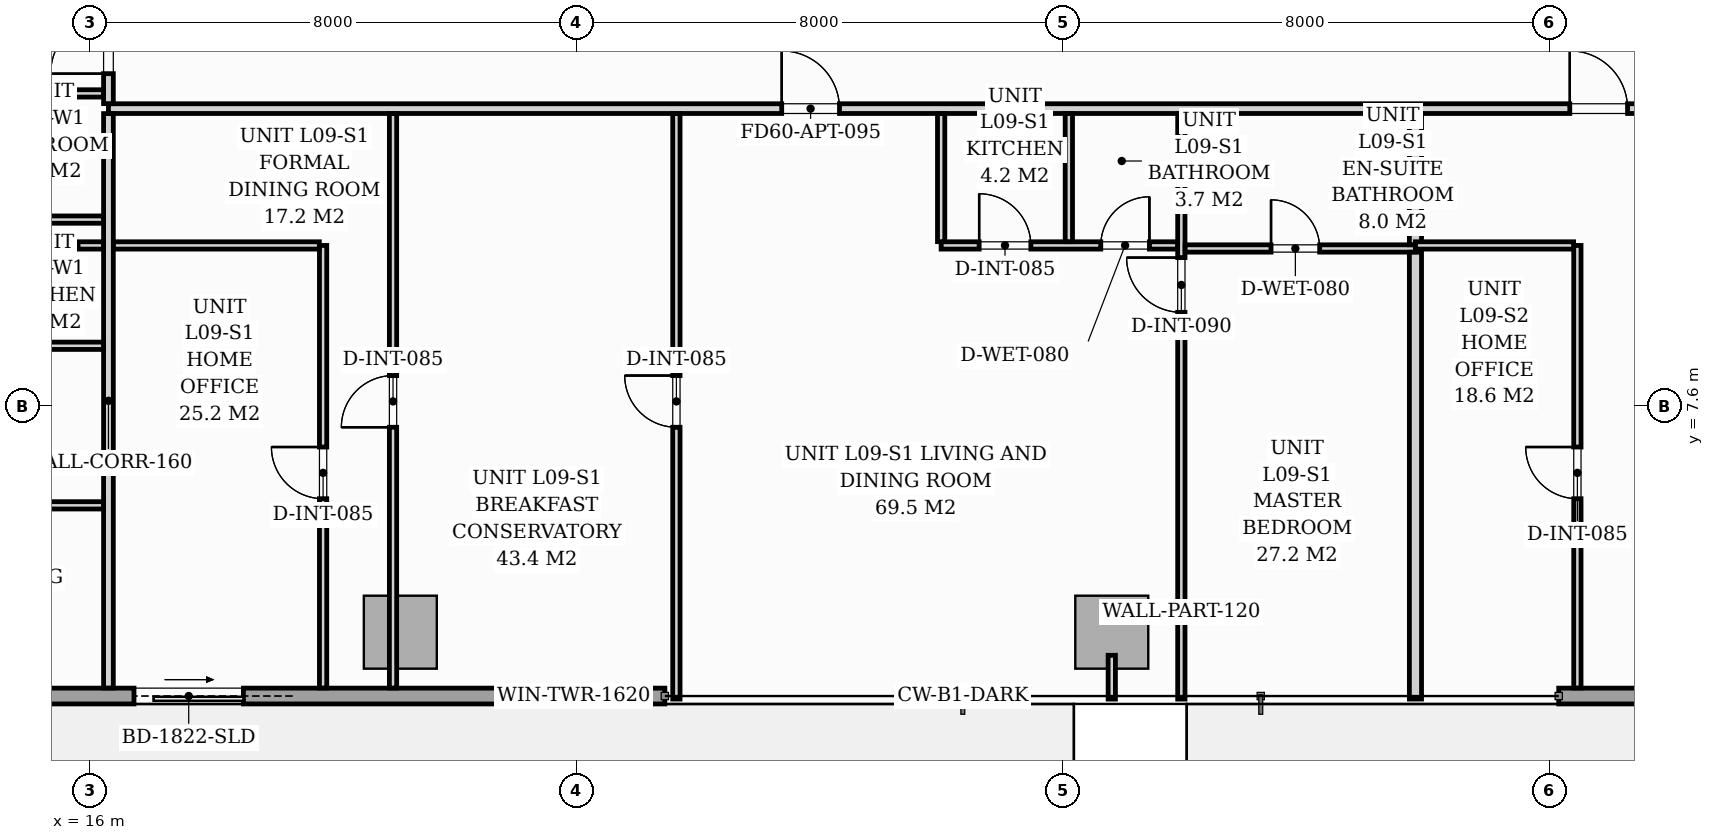
"""IFC4 building model, lengths in metres.
Left out: names, types, materials, properties, quantities, classifications, styles, units other than length and angle.
Written with IfcOpenShell. Run it as: python <this file> out.ifc"""

import sys

from ifc_helpers import new_model, si_unit, direction, frame, frame_2d, origin, origin_2d, place, context, subcontext, project, spatial, rectangle, extrude, source, transform, mapped, element, fill, save


model = new_model("IFC4")
c1 = context("Model", 3, precision=1e-05, world=origin(), true_north=direction((0.0, 1.0)))
c2 = subcontext(c1, "Body", "Model", "MODEL_VIEW")
j1 = project(units=[si_unit("LENGTHUNIT", "METRE"), si_unit("PLANEANGLEUNIT", "RADIAN")], contexts=[c1])
p1 = place(None, origin())
s1 = spatial("IfcSite", under=j1, at=p1, CompositionType="ELEMENT")
p2 = place(p1, origin())
s2 = spatial("IfcBuilding", under=s1, at=p2, CompositionType="ELEMENT")
p3 = place(p2, frame((0.0, 0.0, 35.8)))
s3 = spatial("IfcBuildingStorey", under=s2, at=p3, CompositionType="ELEMENT", Elevation=35.8)
m1 = source(origin(), c2, "Body", "SweptSolid", [
    extrude(rectangle(XDim=1.2, YDim=1.2, at=origin_2d()), origin(), (0.0, 0.0, 1.0), 3.196),
])
for number, where, z_axis, x_axis in (
    (1, (21.1, 3.88, 0.002), (0.0, 0.0, 1.0), (1.0, 0.0, 0.0)),
    (2, (32.8, 3.88, 0.002), (0.0, 0.0, 1.0), (1.0, 0.0, 0.0)),
):
    element("IfcColumn", number, at=place(p3, frame(where, z_axis=z_axis, x_axis=x_axis)), inside=s3, PredefinedType="COLUMN", context=c2, shape_type="MappedRepresentation", body=[
        mapped(m1, transform((0.0, 0.0, 0.0), scale=1.0)),
    ])
p4 = place(p3, frame((57.3, 2.83, 0.0), z_axis=(0.0, 0.0, 1.0), x_axis=(-1.0, 0.0, 0.0)))
e3 = element("IfcWall", 3, at=p4, inside=s3, PredefinedType="STANDARD", context=c2, shape_type="SweptSolid", body=[
    extrude(rectangle(XDim=17.15, YDim=0.26, at=frame_2d((8.575, 0.0))), origin(), (0.0, 0.0, 1.0), 2.94),
])
p5 = place(p4, frame((9.924, 0.0, 0.0)))
e4 = element("IfcOpeningElement", 4, at=p5, cuts=e3, PredefinedType="OPENING", context=c2, shape_type="SweptSolid", body=[
    extrude(rectangle(XDim=1.8, YDim=2.06, at=frame_2d((0.9, 1.03))), frame((0.0, 0.14, 0.0), z_axis=(0.0, -1.0, 0.0), x_axis=(1.0, 0.0, 0.0)), (0.0, 0.0, 1.0), 0.28),
])
p6 = place(p4, frame((2.05, 0.0, 0.65)))
e5 = element("IfcOpeningElement", 5, at=p6, cuts=e3, PredefinedType="OPENING", context=c2, shape_type="SweptSolid", body=[
    extrude(rectangle(XDim=1.6, YDim=1.5, at=frame_2d((0.8, 0.75))), frame((0.0, 0.14, 0.0), z_axis=(0.0, -1.0, 0.0), x_axis=(1.0, 0.0, 0.0)), (0.0, 0.0, 1.0), 0.28),
])
p7 = place(p4, frame((6.925, 0.0, 0.75)))
e6 = element("IfcOpeningElement", 6, at=p7, cuts=e3, PredefinedType="OPENING", context=c2, shape_type="SweptSolid", body=[
    extrude(rectangle(XDim=1.6, YDim=1.5, at=frame_2d((0.8, 0.75))), frame((0.0, 0.14, 0.0), z_axis=(0.0, -1.0, 0.0), x_axis=(1.0, 0.0, 0.0)), (0.0, 0.0, 1.0), 0.28),
])
p8 = place(p3, frame((25.45, 2.83, 0.0), z_axis=(0.0, 0.0, 1.0), x_axis=(-1.0, 0.0, 0.0)))
e7 = element("IfcWall", 7, at=p8, inside=s3, PredefinedType="STANDARD", context=c2, shape_type="SweptSolid", body=[
    extrude(rectangle(XDim=17.15, YDim=0.26, at=frame_2d((8.575, 0.0))), origin(), (0.0, 0.0, 1.0), 2.94),
])
p9 = place(p8, frame((6.93, 0.0, 0.0)))
e8 = element("IfcOpeningElement", 8, at=p9, cuts=e7, PredefinedType="OPENING", context=c2, shape_type="SweptSolid", body=[
    extrude(rectangle(XDim=1.8, YDim=2.06, at=frame_2d((0.9, 1.03))), frame((0.0, 0.14, 0.0), z_axis=(0.0, -1.0, 0.0), x_axis=(1.0, 0.0, 0.0)), (0.0, 0.0, 1.0), 0.28),
])
p10 = place(p8, frame((0.7, 0.0, 0.65)))
e9 = element("IfcOpeningElement", 9, at=p10, cuts=e7, PredefinedType="OPENING", context=c2, shape_type="SweptSolid", body=[
    extrude(rectangle(XDim=1.6, YDim=1.5, at=frame_2d((0.8, 0.75))), frame((0.0, 0.14, 0.0), z_axis=(0.0, -1.0, 0.0), x_axis=(1.0, 0.0, 0.0)), (0.0, 0.0, 1.0), 0.28),
])
p11 = place(p3, frame((16.3, 12.49, 0.0), z_axis=(0.0, 0.0, 1.0), x_axis=(1.0, 0.0, 0.0)))
e10 = element("IfcWall", 10, at=p11, inside=s3, PredefinedType="PARTITIONING", context=c2, shape_type="SweptSolid", body=[
    extrude(rectangle(XDim=35.2, YDim=0.16, at=frame_2d((17.6, 0.0))), origin(), (0.0, 0.0, 1.0), 2.94),
])
p12 = place(p11, frame((11.072, 0.0, 0.0)))
e11 = element("IfcOpeningElement", 11, at=p12, cuts=e10, PredefinedType="OPENING", context=c2, shape_type="SweptSolid", body=[
    extrude(rectangle(XDim=0.95, YDim=2.06, at=frame_2d((0.475, 1.03))), frame((0.0, 0.09, 0.0), z_axis=(0.0, -1.0, 0.0), x_axis=(1.0, 0.0, 0.0)), (0.0, 0.0, 1.0), 0.18),
])
p13 = place(p11, frame((24.032, 0.0, 0.0)))
e12 = element("IfcOpeningElement", 12, at=p13, cuts=e10, PredefinedType="OPENING", context=c2, shape_type="SweptSolid", body=[
    extrude(rectangle(XDim=0.95, YDim=2.06, at=frame_2d((0.475, 1.03))), frame((0.0, 0.09, 0.0), z_axis=(0.0, -1.0, 0.0), x_axis=(1.0, 0.0, 0.0)), (0.0, 0.0, 1.0), 0.18),
])
p14 = place(p3, frame((16.3, 2.962, 0.0), z_axis=(0.0, 0.0, 1.0), x_axis=(0.0, 1.0, 0.0)))
e13 = element("IfcWall", 13, at=p14, inside=s3, PredefinedType="PARTITIONING", context=c2, shape_type="SweptSolid", body=[
    extrude(rectangle(XDim=9.446, YDim=0.16, at=frame_2d((4.723, 0.0))), origin(), (0.0, 0.0, 1.0), 2.94),
])
p15 = place(p3, frame((16.3, 12.572, 0.0), z_axis=(0.0, 0.0, 1.0), x_axis=(0.0, 1.0, 0.0)))
e14 = element("IfcWall", 14, at=p15, inside=s3, PredefinedType="PARTITIONING", context=c2, shape_type="SweptSolid", body=[
    extrude(rectangle(XDim=14.866, YDim=0.16, at=frame_2d((7.433, 0.0))), origin(), (0.0, 0.0, 1.0), 2.94),
])
p16 = place(p15, frame((0.493, 0.0, 0.0)))
e15 = element("IfcOpeningElement", 15, at=p16, cuts=e14, PredefinedType="OPENING", context=c2, shape_type="SweptSolid", body=[
    extrude(rectangle(XDim=0.95, YDim=2.06, at=frame_2d((0.475, 1.03))), frame((0.0, 0.09, 0.0), z_axis=(0.0, -1.0, 0.0), x_axis=(1.0, 0.0, 0.0)), (0.0, 0.0, 1.0), 0.18),
])
p17 = place(p15, frame((5.473, 0.0, 0.0)))
e16 = element("IfcOpeningElement", 16, at=p17, cuts=e14, PredefinedType="OPENING", context=c2, shape_type="SweptSolid", body=[
    extrude(rectangle(XDim=0.95, YDim=2.06, at=frame_2d((0.475, 1.03))), frame((0.0, 0.09, 0.0), z_axis=(0.0, -1.0, 0.0), x_axis=(1.0, 0.0, 0.0)), (0.0, 0.0, 1.0), 0.18),
])
p18 = place(p3, frame((33.944, 2.78, 0.0), z_axis=(0.0, 0.0, 1.0), x_axis=(0.0, 1.0, 0.0)))
e17 = element("IfcWall", 17, at=p18, inside=s3, PredefinedType="PARTITIONING", context=c2, shape_type="SweptSolid", body=[
    extrude(rectangle(XDim=9.628, YDim=0.12, at=frame_2d((4.814, 0.0))), origin(), (0.0, 0.0, 1.0), 2.94),
])
p19 = place(p18, frame((6.36, 0.0, 0.0)))
e18 = element("IfcOpeningElement", 18, at=p19, cuts=e17, PredefinedType="OPENING", context=c2, shape_type="SweptSolid", body=[
    extrude(rectangle(XDim=0.9, YDim=2.05, at=frame_2d((0.45, 1.025))), frame((0.0, 0.07, 0.0), z_axis=(0.0, -1.0, 0.0), x_axis=(1.0, 0.0, 0.0)), (0.0, 0.0, 1.0), 0.14),
])
p20 = place(p3, frame((29.994, 10.24, 0.0), z_axis=(0.0, 0.0, 1.0), x_axis=(1.0, 0.0, 0.0)))
e19 = element("IfcWall", 19, at=p20, inside=s3, PredefinedType="PARTITIONING", context=c2, shape_type="SweptSolid", body=[
    extrude(rectangle(XDim=3.888, YDim=0.12, at=frame_2d((1.944, 0.0))), origin(), (0.0, 0.0, 1.0), 2.94),
])
p21 = place(p20, frame((0.625, 0.0, 0.0)))
e20 = element("IfcOpeningElement", 20, at=p21, cuts=e19, PredefinedType="OPENING", context=c2, shape_type="SweptSolid", body=[
    extrude(rectangle(XDim=0.85, YDim=2.05, at=frame_2d((0.425, 1.025))), frame((0.0, 0.07, 0.0), z_axis=(0.0, -1.0, 0.0), x_axis=(1.0, 0.0, 0.0)), (0.0, 0.0, 1.0), 0.14),
])
p22 = place(p20, frame((2.625, 0.0, 0.0)))
e21 = element("IfcOpeningElement", 21, at=p22, cuts=e19, PredefinedType="OPENING", context=c2, shape_type="SweptSolid", body=[
    extrude(rectangle(XDim=0.8, YDim=2.02, at=frame_2d((0.4, 1.01))), frame((0.0, 0.07, 0.0), z_axis=(0.0, -1.0, 0.0), x_axis=(1.0, 0.0, 0.0)), (0.0, 0.0, 1.0), 0.14),
])
for number, where, z_axis, x_axis in (
    (22, (32.094, 10.302, 0.0), (0.0, 0.0, 1.0), (0.0, 1.0, 0.0)),
    (23, (29.994, 10.302, 0.0), (0.0, 0.0, 1.0), (0.0, 1.0, 0.0)),
):
    element("IfcWall", number, at=place(p3, frame(where, z_axis=z_axis, x_axis=x_axis)), inside=s3, PredefinedType="PARTITIONING", context=c2, shape_type="SweptSolid", body=[
        extrude(rectangle(XDim=2.106, YDim=0.12, at=frame_2d((1.053, 0.0))), origin(), (0.0, 0.0, 1.0), 2.94),
    ])
p23 = place(p3, frame((34.006, 10.19, 0.0), z_axis=(0.0, 0.0, 1.0), x_axis=(1.0, 0.0, 0.0)))
e24 = element("IfcWall", 24, at=p23, inside=s3, PredefinedType="PARTITIONING", context=c2, shape_type="SweptSolid", body=[
    extrude(rectangle(XDim=3.788, YDim=0.12, at=frame_2d((1.894, 0.0))), origin(), (0.0, 0.0, 1.0), 2.94),
])
p24 = place(p23, frame((1.413, 0.0, 0.0)))
e25 = element("IfcOpeningElement", 25, at=p24, cuts=e24, PredefinedType="OPENING", context=c2, shape_type="SweptSolid", body=[
    extrude(rectangle(XDim=0.8, YDim=2.02, at=frame_2d((0.4, 1.01))), frame((0.0, 0.07, 0.0), z_axis=(0.0, -1.0, 0.0), x_axis=(1.0, 0.0, 0.0)), (0.0, 0.0, 1.0), 0.14),
])
p25 = place(p3, frame((19.83, 2.962, 0.0), z_axis=(0.0, 0.0, 1.0), x_axis=(0.0, 1.0, 0.0)))
e26 = element("IfcWall", 26, at=p25, inside=s3, PredefinedType="PARTITIONING", context=c2, shape_type="SweptSolid", body=[
    extrude(rectangle(XDim=7.278, YDim=0.12, at=frame_2d((3.639, 0.0))), origin(), (0.0, 0.0, 1.0), 2.94),
])
p26 = place(p25, frame((3.113, 0.0, 0.0)))
e27 = element("IfcOpeningElement", 27, at=p26, cuts=e26, PredefinedType="OPENING", context=c2, shape_type="SweptSolid", body=[
    extrude(rectangle(XDim=0.85, YDim=2.05, at=frame_2d((0.425, 1.025))), frame((0.0, 0.07, 0.0), z_axis=(0.0, -1.0, 0.0), x_axis=(1.0, 0.0, 0.0)), (0.0, 0.0, 1.0), 0.14),
])
p27 = place(p3, frame((15.8, 10.24, 0.0), z_axis=(0.0, 0.0, 1.0), x_axis=(1.0, 0.0, 0.0)))
e28 = element("IfcWall", 28, at=p27, inside=s3, PredefinedType="PARTITIONING", context=c2, shape_type="SweptSolid", body=[
    extrude(rectangle(XDim=0.418, YDim=0.12, at=frame_2d((0.209, 0.0))), origin(), (0.0, 0.0, 1.0), 2.94),
])
p28 = place(p3, frame((16.382, 10.24, 0.0), z_axis=(0.0, 0.0, 1.0), x_axis=(1.0, 0.0, 0.0)))
e29 = element("IfcWall", 29, at=p28, inside=s3, PredefinedType="PARTITIONING", context=c2, shape_type="SweptSolid", body=[
    extrude(rectangle(XDim=3.386, YDim=0.12, at=frame_2d((1.693, 0.0))), origin(), (0.0, 0.0, 1.0), 2.94),
])
p29 = place(p3, frame((20.98, 2.962, 0.0), z_axis=(0.0, 0.0, 1.0), x_axis=(0.0, 1.0, 0.0)))
e30 = element("IfcWall", 30, at=p29, inside=s3, PredefinedType="PARTITIONING", context=c2, shape_type="SweptSolid", body=[
    extrude(rectangle(XDim=9.446, YDim=0.12, at=frame_2d((4.723, 0.0))), origin(), (0.0, 0.0, 1.0), 2.94),
])
p30 = place(p29, frame((4.288, 0.0, 0.0)))
e31 = element("IfcOpeningElement", 31, at=p30, cuts=e30, PredefinedType="OPENING", context=c2, shape_type="SweptSolid", body=[
    extrude(rectangle(XDim=0.85, YDim=2.05, at=frame_2d((0.425, 1.025))), frame((0.0, 0.07, 0.0), z_axis=(0.0, -1.0, 0.0), x_axis=(1.0, 0.0, 0.0)), (0.0, 0.0, 1.0), 0.14),
])
p31 = place(p3, frame((25.64, 2.78, 0.0), z_axis=(0.0, 0.0, 1.0), x_axis=(0.0, 1.0, 0.0)))
e32 = element("IfcWall", 32, at=p31, inside=s3, PredefinedType="PARTITIONING", context=c2, shape_type="SweptSolid", body=[
    extrude(rectangle(XDim=9.628, YDim=0.12, at=frame_2d((4.814, 0.0))), origin(), (0.0, 0.0, 1.0), 2.94),
])
p32 = place(p31, frame((4.47, 0.0, 0.0)))
e33 = element("IfcOpeningElement", 33, at=p32, cuts=e32, PredefinedType="OPENING", context=c2, shape_type="SweptSolid", body=[
    extrude(rectangle(XDim=0.85, YDim=2.05, at=frame_2d((0.425, 1.025))), frame((0.0, 0.07, 0.0), z_axis=(0.0, -1.0, 0.0), x_axis=(1.0, 0.0, 0.0)), (0.0, 0.0, 1.0), 0.14),
])
p33 = place(p3, frame((37.794, 2.78, 0.0), z_axis=(0.0, 0.0, 1.0), x_axis=(0.0, 1.0, 0.0)))
e34 = element("IfcWall", 34, at=p33, inside=s3, PredefinedType="PARTITIONING", context=c2, shape_type="SweptSolid", body=[
    extrude(rectangle(XDim=7.348, YDim=0.2, at=frame_2d((3.674, 0.0))), origin(), (0.0, 0.0, 1.0), 2.94),
])
p34 = place(p3, frame((37.794, 10.252, 0.0), z_axis=(0.0, 0.0, 1.0), x_axis=(0.0, 1.0, 0.0)))
e35 = element("IfcWall", 35, at=p34, inside=s3, PredefinedType="PARTITIONING", context=c2, shape_type="SweptSolid", body=[
    extrude(rectangle(XDim=2.156, YDim=0.2, at=frame_2d((1.078, 0.0))), origin(), (0.0, 0.0, 1.0), 2.94),
])
p35 = place(p3, frame((40.457, 2.962, 0.0), z_axis=(0.0, 0.0, 1.0), x_axis=(0.0, 1.0, 0.0)))
e36 = element("IfcWall", 36, at=p35, inside=s3, PredefinedType="PARTITIONING", context=c2, shape_type="SweptSolid", body=[
    extrude(rectangle(XDim=7.278, YDim=0.12, at=frame_2d((3.639, 0.0))), origin(), (0.0, 0.0, 1.0), 2.94),
])
p36 = place(p35, frame((3.113, 0.0, 0.0)))
e37 = element("IfcOpeningElement", 37, at=p36, cuts=e36, PredefinedType="OPENING", context=c2, shape_type="SweptSolid", body=[
    extrude(rectangle(XDim=0.85, YDim=2.05, at=frame_2d((0.425, 1.025))), frame((0.0, 0.07, 0.0), z_axis=(0.0, -1.0, 0.0), x_axis=(1.0, 0.0, 0.0)), (0.0, 0.0, 1.0), 0.14),
])
p37 = place(p3, frame((37.794, 10.24, 0.0), z_axis=(0.0, 0.0, 1.0), x_axis=(1.0, 0.0, 0.0)))
e38 = element("IfcWall", 38, at=p37, inside=s3, PredefinedType="PARTITIONING", context=c2, shape_type="SweptSolid", body=[
    extrude(rectangle(XDim=2.601, YDim=0.12, at=frame_2d((1.301, 0.0))), origin(), (0.0, 0.0, 1.0), 2.94),
])
for number, where, z_axis, x_axis in (
    (39, (13.962, 10.665, 0.0), (0.0, 0.0, 1.0), (1.0, 0.0, 0.0)),
    (40, (13.962, 8.59, 0.0), (0.0, 0.0, 1.0), (1.0, 0.0, 0.0)),
    (41, (13.962, 12.74, 0.0), (0.0, 0.0, 1.0), (1.0, 0.0, 0.0)),
):
    element("IfcWall", number, at=place(p3, frame(where, z_axis=z_axis, x_axis=x_axis)), inside=s3, PredefinedType="PARTITIONING", context=c2, shape_type="SweptSolid", body=[
        extrude(rectangle(XDim=2.256, YDim=0.12, at=frame_2d((1.128, 0.0))), origin(), (0.0, 0.0, 1.0), 2.94),
    ])
p38 = place(p3, frame((5.88, 5.966, 0.0), z_axis=(0.0, 0.0, 1.0), x_axis=(1.0, 0.0, 0.0)))
e42 = element("IfcWall", 42, at=p38, inside=s3, PredefinedType="PARTITIONING", context=c2, shape_type="SweptSolid", body=[
    extrude(rectangle(XDim=10.338, YDim=0.12, at=frame_2d((5.169, 0.0))), origin(), (0.0, 0.0, 1.0), 2.94),
])
p39 = place(p38, frame((4.735, 0.0, 0.0)))
e43 = element("IfcOpeningElement", 43, at=p39, cuts=e42, PredefinedType="OPENING", context=c2, shape_type="SweptSolid", body=[
    extrude(rectangle(XDim=0.85, YDim=2.05, at=frame_2d((0.425, 1.025))), frame((0.0, 0.07, 0.0), z_axis=(0.0, -1.0, 0.0), x_axis=(1.0, 0.0, 0.0)), (0.0, 0.0, 1.0), 0.14),
])
p40 = place(p3, frame((32.8, 3.5, 0.0), z_axis=(0.0, 0.0, 1.0), x_axis=(0.0, -1.0, 0.0)))
e44 = element("IfcWall", 44, at=p40, inside=s3, PredefinedType="PARTITIONING", context=c2, shape_type="SweptSolid", body=[
    extrude(rectangle(XDim=0.72, YDim=0.12, at=frame_2d((0.36, 0.0))), origin(), (0.0, 0.0, 1.0), 2.94),
])
m2 = source(origin(), c2, "Body", "SweptSolid", [
    extrude(rectangle(XDim=1.8, YDim=2.06, at=frame_2d((0.9, 1.03))), frame((0.0, 0.025, 0.0), z_axis=(0.0, -1.0, 0.0), x_axis=(1.0, 0.0, 0.0)), (0.0, 0.0, 1.0), 0.05),
])
p41 = place(p9, origin())
e45 = element("IfcDoor", 45, at=p41, inside=s3, OperationType="SLIDING_TO_LEFT", PredefinedType="DOOR", context=c2, shape_type="MappedRepresentation", body=[
    mapped(m2, transform((0.0, 0.0, 0.0), scale=1.0)),
])
fill(e8, e45)
m3 = source(origin(), c2, "Body", "SweptSolid", [
    extrude(rectangle(XDim=1.6, YDim=1.5, at=frame_2d((0.8, 0.75))), frame((0.0, 0.03, 0.0), z_axis=(0.0, -1.0, 0.0), x_axis=(1.0, 0.0, 0.0)), (0.0, 0.0, 1.0), 0.06),
])
p42 = place(p10, origin())
e46 = element("IfcWindow", 46, at=p42, inside=s3, PartitioningType="SINGLE_PANEL", PredefinedType="WINDOW", context=c2, shape_type="MappedRepresentation", body=[
    mapped(m3, transform((0.0, 0.0, 0.0), scale=1.0)),
])
fill(e9, e46)
m4 = source(origin(), c2, "Body", "SweptSolid", [
    extrude(rectangle(XDim=0.8, YDim=2.02, at=frame_2d((0.4, 1.01))), frame((0.0, 0.025, 0.0), z_axis=(0.0, -1.0, 0.0), x_axis=(1.0, 0.0, 0.0)), (0.0, 0.0, 1.0), 0.05),
])
p43 = place(p24, origin())
e47 = element("IfcDoor", 47, at=p43, inside=s3, OperationType="SINGLE_SWING_LEFT", PredefinedType="DOOR", context=c2, shape_type="MappedRepresentation", body=[
    mapped(m4, transform((0.0, 0.0, 0.0), scale=1.0)),
])
fill(e25, e47)
m5 = source(origin(), c2, "Body", "SweptSolid", [
    extrude(rectangle(XDim=0.85, YDim=2.05, at=frame_2d((0.425, 1.025))), frame((0.0, 0.025, 0.0), z_axis=(0.0, -1.0, 0.0), x_axis=(1.0, 0.0, 0.0)), (0.0, 0.0, 1.0), 0.05),
])
p44 = place(p26, origin())
e48 = element("IfcDoor", 48, at=p44, inside=s3, OperationType="SINGLE_SWING_RIGHT", PredefinedType="DOOR", context=c2, shape_type="MappedRepresentation", body=[
    mapped(m5, transform((0.0, 0.0, 0.0), scale=1.0)),
])
fill(e27, e48)
p45 = place(p30, origin())
e49 = element("IfcDoor", 49, at=p45, inside=s3, OperationType="SINGLE_SWING_LEFT", PredefinedType="DOOR", context=c2, shape_type="MappedRepresentation", body=[
    mapped(m5, transform((0.0, 0.0, 0.0), scale=1.0)),
])
fill(e31, e49)
p46 = place(p32, origin())
e50 = element("IfcDoor", 50, at=p46, inside=s3, OperationType="SINGLE_SWING_RIGHT", PredefinedType="DOOR", context=c2, shape_type="MappedRepresentation", body=[
    mapped(m5, transform((0.0, 0.0, 0.0), scale=1.0)),
])
fill(e33, e50)
m6 = source(origin(), c2, "Body", "SweptSolid", [
    extrude(rectangle(XDim=0.95, YDim=2.06, at=frame_2d((0.475, 1.03))), frame((0.0, 0.025, 0.0), z_axis=(0.0, -1.0, 0.0), x_axis=(1.0, 0.0, 0.0)), (0.0, 0.0, 1.0), 0.05),
])
p47 = place(p12, origin())
e51 = element("IfcDoor", 51, at=p47, inside=s3, OperationType="SINGLE_SWING_LEFT", PredefinedType="DOOR", context=c2, shape_type="MappedRepresentation", body=[
    mapped(m6, transform((0.0, 0.0, 0.0), scale=1.0)),
])
fill(e11, e51)
m7 = source(origin(), c2, "Body", "SweptSolid", [
    extrude(rectangle(XDim=0.9, YDim=2.05, at=frame_2d((0.45, 1.025))), frame((0.0, 0.025, 0.0), z_axis=(0.0, -1.0, 0.0), x_axis=(1.0, 0.0, 0.0)), (0.0, 0.0, 1.0), 0.05),
])
p48 = place(p19, origin())
e52 = element("IfcDoor", 52, at=p48, inside=s3, OperationType="SINGLE_SWING_RIGHT", PredefinedType="DOOR", context=c2, shape_type="MappedRepresentation", body=[
    mapped(m7, transform((0.0, 0.0, 0.0), scale=1.0)),
])
fill(e18, e52)
p49 = place(p21, origin())
e53 = element("IfcDoor", 53, at=p49, inside=s3, OperationType="SINGLE_SWING_LEFT", PredefinedType="DOOR", context=c2, shape_type="MappedRepresentation", body=[
    mapped(m5, transform((0.0, 0.0, 0.0), scale=1.0)),
])
fill(e20, e53)
p50 = place(p22, origin())
e54 = element("IfcDoor", 54, at=p50, inside=s3, OperationType="SINGLE_SWING_RIGHT", PredefinedType="DOOR", context=c2, shape_type="MappedRepresentation", body=[
    mapped(m4, transform((0.0, 0.0, 0.0), scale=1.0)),
])
fill(e21, e54)
p51 = place(p36, origin())
e55 = element("IfcDoor", 55, at=p51, inside=s3, OperationType="SINGLE_SWING_RIGHT", PredefinedType="DOOR", context=c2, shape_type="MappedRepresentation", body=[
    mapped(m5, transform((0.0, 0.0, 0.0), scale=1.0)),
])
fill(e37, e55)
p52 = place(p13, origin())
e56 = element("IfcDoor", 56, at=p52, inside=s3, OperationType="SINGLE_SWING_LEFT", PredefinedType="DOOR", context=c2, shape_type="MappedRepresentation", body=[
    mapped(m6, transform((0.0, 0.0, 0.0), scale=1.0)),
])
fill(e12, e56)
p53 = place(p16, origin())
e57 = element("IfcDoor", 57, at=p53, inside=s3, OperationType="SINGLE_SWING_LEFT", PredefinedType="DOOR", context=c2, shape_type="MappedRepresentation", body=[
    mapped(m6, transform((0.0, 0.0, 0.0), scale=1.0)),
])
fill(e15, e57)
save(model, sys.argv[1])
